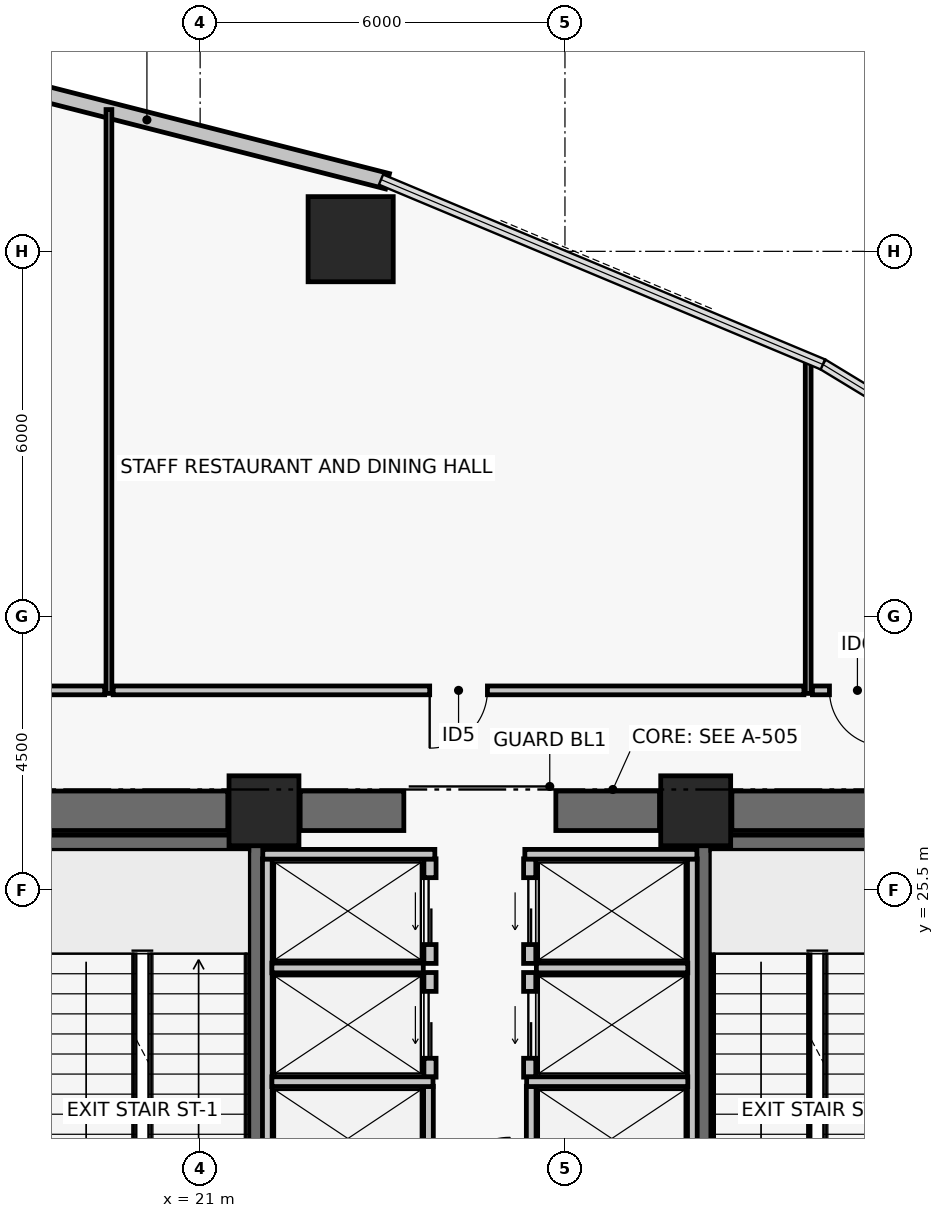
"""IFC4 building model, lengths in metres.
Left out: names, types, materials, properties, quantities, classifications, styles, units other than length and angle.
Written with IfcOpenShell. Run it as: python <this file> out.ifc"""

import sys

from ifc_helpers import new_model, si_unit, direction, frame, frame_2d, origin, origin_2d, place, context, subcontext, project, spatial, rectangle, hollow_rectangle, extrude, element, fill, save


model = new_model("IFC4")
c1 = context("Model", 3, precision=1e-05, world=origin(), true_north=direction((0.0, 1.0)))
c2 = subcontext(c1, "Body", "Model", "MODEL_VIEW")
j1 = project(units=[si_unit("LENGTHUNIT", "METRE"), si_unit("PLANEANGLEUNIT", "RADIAN")], contexts=[c1])
p1 = place(None, origin())
s1 = spatial("IfcSite", under=j1, at=p1, CompositionType="ELEMENT")
p2 = place(p1, origin())
s2 = spatial("IfcBuilding", under=s1, at=p2, CompositionType="ELEMENT")
p3 = place(p2, frame((0.0, 0.0, 18.0)))
s3 = spatial("IfcBuildingStorey", under=s2, at=p3, CompositionType="ELEMENT", Elevation=18.0)
for number, where, z_axis, x_axis in (
    (1, (22.05, 26.8, 0.0), (0.0, 0.0, 1.0), (1.0, 0.0, 0.0)),
    (2, (29.15, 26.8, 0.0), (0.0, 0.0, 1.0), (1.0, 0.0, 0.0)),
):
    element("IfcColumn", number, at=place(p3, frame(where, z_axis=z_axis, x_axis=x_axis)), inside=s3, PredefinedType="COLUMN", context=c2, shape_type="SweptSolid", body=[
        extrude(rectangle(XDim=1.15, YDim=1.15, at=origin_2d()), origin(), (0.0, 0.0, 1.0), 4.8),
    ])
p4 = place(p3, frame((18.395, 26.8, 0.0), z_axis=(0.0, 0.0, 1.0), x_axis=(1.0, 0.0, 0.0)))
e3 = element("IfcWall", 3, at=p4, inside=s3, PredefinedType="SHEAR", context=c2, shape_type="SweptSolid", body=[
    extrude(rectangle(XDim=3.06, YDim=0.65, at=frame_2d((1.53, 0.0))), origin(), (0.0, 0.0, 1.0), 4.48),
])
p5 = place(p3, frame((22.645, 26.8, 0.0), z_axis=(0.0, 0.0, 1.0), x_axis=(1.0, 0.0, 0.0)))
e4 = element("IfcWall", 4, at=p5, inside=s3, PredefinedType="SHEAR", context=c2, shape_type="SweptSolid", body=[
    extrude(rectangle(XDim=1.705, YDim=0.65, at=frame_2d((0.853, 0.0))), origin(), (0.0, 0.0, 1.0), 4.48),
])
p6 = place(p3, frame((26.85, 26.8, 0.0), z_axis=(0.0, 0.0, 1.0), x_axis=(1.0, 0.0, 0.0)))
e5 = element("IfcWall", 5, at=p6, inside=s3, PredefinedType="SHEAR", context=c2, shape_type="SweptSolid", body=[
    extrude(rectangle(XDim=1.705, YDim=0.65, at=frame_2d((0.853, 0.0))), origin(), (0.0, 0.0, 1.0), 4.48),
])
p7 = place(p3, frame((29.745, 26.8, 0.0), z_axis=(0.0, 0.0, 1.0), x_axis=(1.0, 0.0, 0.0)))
e6 = element("IfcWall", 6, at=p7, inside=s3, PredefinedType="SHEAR", context=c2, shape_type="SweptSolid", body=[
    extrude(rectangle(XDim=3.06, YDim=0.65, at=frame_2d((1.53, 0.0))), origin(), (0.0, 0.0, 1.0), 4.48),
])
p8 = place(p3, frame((21.925, 17.6, 0.0), z_axis=(0.0, 0.0, 1.0), x_axis=(0.0, 1.0, 0.0)))
e7 = element("IfcWall", 7, at=p8, inside=s3, PredefinedType="SHEAR", context=c2, shape_type="SweptSolid", body=[
    extrude(rectangle(XDim=8.8, YDim=0.25, at=frame_2d((4.4, 0.0))), origin(), (0.0, 0.0, 1.0), 4.48),
])
p9 = place(p8, frame((0.35, 0.0, 0.0)))
e8 = element("IfcOpeningElement", 8, at=p9, cuts=e7, PredefinedType="OPENING", context=c2, shape_type="SweptSolid", body=[
    extrude(rectangle(XDim=1.05, YDim=2.08, at=frame_2d((0.525, 1.04))), frame((0.0, 0.135, 0.0), z_axis=(0.0, -1.0, 0.0), x_axis=(1.0, 0.0, 0.0)), (0.0, 0.0, 1.0), 0.27),
])
p10 = place(p3, frame((18.379, 26.275, 0.0), z_axis=(0.0, 0.0, 1.0), x_axis=(1.0, 0.0, 0.0)))
e9 = element("IfcWall", 9, at=p10, inside=s3, PredefinedType="SHEAR", context=c2, shape_type="SweptSolid", body=[
    extrude(rectangle(XDim=3.421, YDim=0.25, at=frame_2d((1.71, 0.0))), origin(), (0.0, 0.0, 1.0), 4.48),
])
p11 = place(p3, frame((29.275, 17.6, 0.0), z_axis=(0.0, 0.0, 1.0), x_axis=(0.0, 1.0, 0.0)))
e10 = element("IfcWall", 10, at=p11, inside=s3, PredefinedType="SHEAR", context=c2, shape_type="SweptSolid", body=[
    extrude(rectangle(XDim=8.8, YDim=0.25, at=frame_2d((4.4, 0.0))), origin(), (0.0, 0.0, 1.0), 4.48),
])
p12 = place(p11, frame((0.35, 0.0, 0.0)))
e11 = element("IfcOpeningElement", 11, at=p12, cuts=e10, PredefinedType="OPENING", context=c2, shape_type="SweptSolid", body=[
    extrude(rectangle(XDim=1.05, YDim=2.08, at=frame_2d((0.525, 1.04))), frame((0.0, 0.135, 0.0), z_axis=(0.0, -1.0, 0.0), x_axis=(1.0, 0.0, 0.0)), (0.0, 0.0, 1.0), 0.27),
])
p13 = place(p3, frame((29.4, 26.275, 0.0), z_axis=(0.0, 0.0, 1.0), x_axis=(1.0, 0.0, 0.0)))
e12 = element("IfcWall", 12, at=p13, inside=s3, PredefinedType="SHEAR", context=c2, shape_type="SweptSolid", body=[
    extrude(rectangle(XDim=3.421, YDim=0.25, at=frame_2d((1.71, 0.0))), origin(), (0.0, 0.0, 1.0), 4.48),
])
p14 = place(p3, frame((23.476, 36.2, 0.0), z_axis=(0.0, 0.0, 1.0), x_axis=(1.0, 0.0, 0.0)))
e13 = element("IfcColumn", 13, at=p14, inside=s3, PredefinedType="COLUMN", context=c2, shape_type="SweptSolid", body=[
    extrude(hollow_rectangle(XDim=1.4, YDim=1.4, WallThickness=0.055, at=origin_2d()), origin(), (0.0, 0.0, 1.0), 4.8),
])
p15 = place(p3, frame((16.168, 39.171, 0.0), z_axis=(0.0, 0.0, 1.0), x_axis=(0.968981557045, -0.247133045354, 0.0)))
e14 = element("IfcWall", 14, at=p15, inside=s3, PredefinedType="PARTITIONING", context=c2, shape_type="SweptSolid", body=[
    extrude(rectangle(XDim=8.167, YDim=0.26, at=frame_2d((4.083, 0.0))), origin(), (0.0, 0.0, 1.0), 4.48),
])
p16 = place(p3, frame((24.78, 22.42, 0.0), z_axis=(0.0, 0.0, 1.0), x_axis=(0.0, 1.0, 0.0)))
e15 = element("IfcWall", 15, at=p16, inside=s3, PredefinedType="PARTITIONING", context=c2, shape_type="SweptSolid", body=[
    extrude(rectangle(XDim=1.72, YDim=0.2, at=frame_2d((0.86, 0.0))), origin(), (0.0, 0.0, 1.0), 4.48),
])
p17 = place(p16, frame((0.31, 0.0, 0.0)))
e16 = element("IfcOpeningElement", 16, at=p17, cuts=e15, PredefinedType="OPENING", context=c2, shape_type="SweptSolid", body=[
    extrude(rectangle(XDim=1.1, YDim=2.08, at=frame_2d((0.55, 1.04))), frame((0.0, 0.11, 0.0), z_axis=(0.0, -1.0, 0.0), x_axis=(1.0, 0.0, 0.0)), (0.0, 0.0, 1.0), 0.22),
])
p18 = place(p3, frame((24.78, 24.29, 0.0), z_axis=(0.0, 0.0, 1.0), x_axis=(0.0, 1.0, 0.0)))
e17 = element("IfcWall", 17, at=p18, inside=s3, PredefinedType="PARTITIONING", context=c2, shape_type="SweptSolid", body=[
    extrude(rectangle(XDim=1.72, YDim=0.2, at=frame_2d((0.86, 0.0))), origin(), (0.0, 0.0, 1.0), 4.48),
])
p19 = place(p18, frame((0.31, 0.0, 0.0)))
e18 = element("IfcOpeningElement", 18, at=p19, cuts=e17, PredefinedType="OPENING", context=c2, shape_type="SweptSolid", body=[
    extrude(rectangle(XDim=1.1, YDim=2.08, at=frame_2d((0.55, 1.04))), frame((0.0, 0.11, 0.0), z_axis=(0.0, -1.0, 0.0), x_axis=(1.0, 0.0, 0.0)), (0.0, 0.0, 1.0), 0.22),
])
p20 = place(p3, frame((26.42, 22.42, 0.0), z_axis=(0.0, 0.0, 1.0), x_axis=(0.0, 1.0, 0.0)))
e19 = element("IfcWall", 19, at=p20, inside=s3, PredefinedType="PARTITIONING", context=c2, shape_type="SweptSolid", body=[
    extrude(rectangle(XDim=1.72, YDim=0.2, at=frame_2d((0.86, 0.0))), origin(), (0.0, 0.0, 1.0), 4.48),
])
p21 = place(p20, frame((0.31, 0.0, 0.0)))
e20 = element("IfcOpeningElement", 20, at=p21, cuts=e19, PredefinedType="OPENING", context=c2, shape_type="SweptSolid", body=[
    extrude(rectangle(XDim=1.1, YDim=2.08, at=frame_2d((0.55, 1.04))), frame((0.0, 0.11, 0.0), z_axis=(0.0, -1.0, 0.0), x_axis=(1.0, 0.0, 0.0)), (0.0, 0.0, 1.0), 0.22),
])
p22 = place(p3, frame((26.42, 24.29, 0.0), z_axis=(0.0, 0.0, 1.0), x_axis=(0.0, 1.0, 0.0)))
e21 = element("IfcWall", 21, at=p22, inside=s3, PredefinedType="PARTITIONING", context=c2, shape_type="SweptSolid", body=[
    extrude(rectangle(XDim=1.72, YDim=0.2, at=frame_2d((0.86, 0.0))), origin(), (0.0, 0.0, 1.0), 4.48),
])
p23 = place(p22, frame((0.31, 0.0, 0.0)))
e22 = element("IfcOpeningElement", 22, at=p23, cuts=e21, PredefinedType="OPENING", context=c2, shape_type="SweptSolid", body=[
    extrude(rectangle(XDim=1.1, YDim=2.08, at=frame_2d((0.55, 1.04))), frame((0.0, 0.11, 0.0), z_axis=(0.0, -1.0, 0.0), x_axis=(1.0, 0.0, 0.0)), (0.0, 0.0, 1.0), 0.22),
])
p24 = place(p3, frame((22.105, 20.56, 0.0), z_axis=(0.0, 0.0, 1.0), x_axis=(0.0, 1.0, 0.0)))
e23 = element("IfcWall", 23, at=p24, inside=s3, PredefinedType="PARTITIONING", context=c2, shape_type="SweptSolid", body=[
    extrude(rectangle(XDim=5.45, YDim=0.16, at=frame_2d((2.725, 0.0))), origin(), (0.0, 0.0, 1.0), 4.48),
])
p25 = place(p3, frame((24.755, 20.56, 0.0), z_axis=(0.0, 0.0, 1.0), x_axis=(0.0, 1.0, 0.0)))
e24 = element("IfcWall", 24, at=p25, inside=s3, PredefinedType="PARTITIONING", context=c2, shape_type="SweptSolid", body=[
    extrude(rectangle(XDim=1.71, YDim=0.16, at=frame_2d((0.855, 0.0))), origin(), (0.0, 0.0, 1.0), 4.48),
])
p26 = place(p3, frame((22.18, 22.345, 0.0), z_axis=(0.0, 0.0, 1.0), x_axis=(1.0, 0.0, 0.0)))
e25 = element("IfcWall", 25, at=p26, inside=s3, PredefinedType="PARTITIONING", context=c2, shape_type="SweptSolid", body=[
    extrude(rectangle(XDim=2.65, YDim=0.16, at=frame_2d((1.325, 0.0))), origin(), (0.0, 0.0, 1.0), 4.48),
])
p27 = place(p3, frame((22.18, 24.215, 0.0), z_axis=(0.0, 0.0, 1.0), x_axis=(1.0, 0.0, 0.0)))
e26 = element("IfcWall", 26, at=p27, inside=s3, PredefinedType="PARTITIONING", context=c2, shape_type="SweptSolid", body=[
    extrude(rectangle(XDim=2.49, YDim=0.16, at=frame_2d((1.245, 0.0))), origin(), (0.0, 0.0, 1.0), 4.48),
])
p28 = place(p3, frame((22.03, 26.085, 0.0), z_axis=(0.0, 0.0, 1.0), x_axis=(1.0, 0.0, 0.0)))
e27 = element("IfcWall", 27, at=p28, inside=s3, PredefinedType="PARTITIONING", context=c2, shape_type="SweptSolid", body=[
    extrude(rectangle(XDim=2.83, YDim=0.16, at=frame_2d((1.415, 0.0))), origin(), (0.0, 0.0, 1.0), 4.48),
])
p29 = place(p3, frame((29.095, 20.56, 0.0), z_axis=(0.0, 0.0, 1.0), x_axis=(0.0, 1.0, 0.0)))
e28 = element("IfcWall", 28, at=p29, inside=s3, PredefinedType="PARTITIONING", context=c2, shape_type="SweptSolid", body=[
    extrude(rectangle(XDim=5.45, YDim=0.16, at=frame_2d((2.725, 0.0))), origin(), (0.0, 0.0, 1.0), 4.48),
])
p30 = place(p3, frame((26.445, 20.56, 0.0), z_axis=(0.0, 0.0, 1.0), x_axis=(0.0, 1.0, 0.0)))
e29 = element("IfcWall", 29, at=p30, inside=s3, PredefinedType="PARTITIONING", context=c2, shape_type="SweptSolid", body=[
    extrude(rectangle(XDim=1.71, YDim=0.16, at=frame_2d((0.855, 0.0))), origin(), (0.0, 0.0, 1.0), 4.48),
])
p31 = place(p3, frame((26.37, 22.345, 0.0), z_axis=(0.0, 0.0, 1.0), x_axis=(1.0, 0.0, 0.0)))
e30 = element("IfcWall", 30, at=p31, inside=s3, PredefinedType="PARTITIONING", context=c2, shape_type="SweptSolid", body=[
    extrude(rectangle(XDim=2.65, YDim=0.16, at=frame_2d((1.325, 0.0))), origin(), (0.0, 0.0, 1.0), 4.48),
])
p32 = place(p3, frame((26.53, 24.215, 0.0), z_axis=(0.0, 0.0, 1.0), x_axis=(1.0, 0.0, 0.0)))
e31 = element("IfcWall", 31, at=p32, inside=s3, PredefinedType="PARTITIONING", context=c2, shape_type="SweptSolid", body=[
    extrude(rectangle(XDim=2.49, YDim=0.16, at=frame_2d((1.245, 0.0))), origin(), (0.0, 0.0, 1.0), 4.48),
])
p33 = place(p3, frame((26.34, 26.085, 0.0), z_axis=(0.0, 0.0, 1.0), x_axis=(1.0, 0.0, 0.0)))
e32 = element("IfcWall", 32, at=p33, inside=s3, PredefinedType="PARTITIONING", context=c2, shape_type="SweptSolid", body=[
    extrude(rectangle(XDim=2.83, YDim=0.16, at=frame_2d((1.415, 0.0))), origin(), (0.0, 0.0, 1.0), 4.48),
])
p34 = place(p3, frame((32.8, 28.78, 0.0), z_axis=(0.0, 0.0, 1.0), x_axis=(-1.0, 0.0, 0.0)))
e33 = element("IfcWall", 33, at=p34, inside=s3, PredefinedType="PARTITIONING", context=c2, shape_type="SweptSolid", body=[
    extrude(rectangle(XDim=1.73, YDim=0.145, at=frame_2d((0.865, 0.0))), origin(), (0.0, 0.0, 1.0), 4.01),
])
p35 = place(p34, frame((0.53, 0.0, 0.0)))
e34 = element("IfcOpeningElement", 34, at=p35, cuts=e33, PredefinedType="OPENING", context=c2, shape_type="SweptSolid", body=[
    extrude(rectangle(XDim=0.92, YDim=2.05, at=frame_2d((0.46, 1.025))), frame((0.0, 0.083, 0.0), z_axis=(0.0, -1.0, 0.0), x_axis=(1.0, 0.0, 0.0)), (0.0, 0.0, 1.0), 0.165),
])
p36 = place(p3, frame((30.93, 28.78, 0.0), z_axis=(0.0, 0.0, 1.0), x_axis=(-1.0, 0.0, 0.0)))
e35 = element("IfcWall", 35, at=p36, inside=s3, PredefinedType="PARTITIONING", context=c2, shape_type="SweptSolid", body=[
    extrude(rectangle(XDim=11.36, YDim=0.145, at=frame_2d((5.68, 0.0))), origin(), (0.0, 0.0, 1.0), 3.56),
])
p37 = place(p36, frame((5.205, 0.0, 0.0)))
e36 = element("IfcOpeningElement", 36, at=p37, cuts=e35, PredefinedType="OPENING", context=c2, shape_type="SweptSolid", body=[
    extrude(rectangle(XDim=0.95, YDim=2.06, at=frame_2d((0.475, 1.03))), frame((0.0, 0.083, 0.0), z_axis=(0.0, -1.0, 0.0), x_axis=(1.0, 0.0, 0.0)), (0.0, 0.0, 1.0), 0.165),
])
p38 = place(p3, frame((19.43, 28.78, 0.0), z_axis=(0.0, 0.0, 1.0), x_axis=(-1.0, 0.0, 0.0)))
e37 = element("IfcWall", 37, at=p38, inside=s3, PredefinedType="PARTITIONING", context=c2, shape_type="SweptSolid", body=[
    extrude(rectangle(XDim=3.53, YDim=0.145, at=frame_2d((1.765, 0.0))), origin(), (0.0, 0.0, 1.0), 3.56),
])
p39 = place(p38, frame((2.33, 0.0, 0.0)))
e38 = element("IfcOpeningElement", 38, at=p39, cuts=e37, PredefinedType="OPENING", context=c2, shape_type="SweptSolid", body=[
    extrude(rectangle(XDim=0.92, YDim=2.05, at=frame_2d((0.46, 1.025))), frame((0.0, 0.083, 0.0), z_axis=(0.0, -1.0, 0.0), x_axis=(1.0, 0.0, 0.0)), (0.0, 0.0, 1.0), 0.165),
])
p40 = place(p3, frame((19.5, 28.73, 0.0), z_axis=(0.0, 0.0, 1.0), x_axis=(0.0, 1.0, 0.0)))
e39 = element("IfcWall", 39, at=p40, inside=s3, PredefinedType="PARTITIONING", context=c2, shape_type="SweptSolid", body=[
    extrude(rectangle(XDim=9.602, YDim=0.095, at=frame_2d((4.801, 0.0))), origin(), (0.0, 0.0, 1.0), 3.86),
])
p41 = place(p3, frame((31.0, 28.73, 0.0), z_axis=(0.0, 0.0, 1.0), x_axis=(0.0, 1.0, 0.0)))
e40 = element("IfcWall", 40, at=p41, inside=s3, PredefinedType="PARTITIONING", context=c2, shape_type="SweptSolid", body=[
    extrude(rectangle(XDim=5.522, YDim=0.095, at=frame_2d((2.761, 0.0))), origin(), (0.0, 0.0, 1.0), 3.86),
])
p42 = place(p17, origin())
e41 = element("IfcDoor", 41, at=p42, inside=s3, OperationType="DOUBLE_DOOR_SLIDING", PredefinedType="DOOR", context=c2, shape_type="SweptSolid", body=[
    extrude(rectangle(XDim=1.1, YDim=2.08, at=frame_2d((0.55, 1.04))), frame((0.0, 0.025, 0.0), z_axis=(0.0, -1.0, 0.0), x_axis=(1.0, 0.0, 0.0)), (0.0, 0.0, 1.0), 0.05),
])
fill(e16, e41)
p43 = place(p19, origin())
e42 = element("IfcDoor", 42, at=p43, inside=s3, OperationType="DOUBLE_DOOR_SLIDING", PredefinedType="DOOR", context=c2, shape_type="SweptSolid", body=[
    extrude(rectangle(XDim=1.1, YDim=2.08, at=frame_2d((0.55, 1.04))), frame((0.0, 0.025, 0.0), z_axis=(0.0, -1.0, 0.0), x_axis=(1.0, 0.0, 0.0)), (0.0, 0.0, 1.0), 0.05),
])
fill(e18, e42)
p44 = place(p21, origin())
e43 = element("IfcDoor", 43, at=p44, inside=s3, OperationType="DOUBLE_DOOR_SLIDING", PredefinedType="DOOR", context=c2, shape_type="SweptSolid", body=[
    extrude(rectangle(XDim=1.1, YDim=2.08, at=frame_2d((0.55, 1.04))), frame((0.0, 0.025, 0.0), z_axis=(0.0, -1.0, 0.0), x_axis=(1.0, 0.0, 0.0)), (0.0, 0.0, 1.0), 0.05),
])
fill(e20, e43)
p45 = place(p23, origin())
e44 = element("IfcDoor", 44, at=p45, inside=s3, OperationType="DOUBLE_DOOR_SLIDING", PredefinedType="DOOR", context=c2, shape_type="SweptSolid", body=[
    extrude(rectangle(XDim=1.1, YDim=2.08, at=frame_2d((0.55, 1.04))), frame((0.0, 0.025, 0.0), z_axis=(0.0, -1.0, 0.0), x_axis=(1.0, 0.0, 0.0)), (0.0, 0.0, 1.0), 0.05),
])
fill(e22, e44)
p46 = place(p35, origin())
e45 = element("IfcDoor", 45, at=p46, inside=s3, OperationType="SINGLE_SWING_LEFT", PredefinedType="DOOR", context=c2, shape_type="SweptSolid", body=[
    extrude(rectangle(XDim=0.92, YDim=2.05, at=frame_2d((0.46, 1.025))), frame((0.0, 0.025, 0.0), z_axis=(0.0, -1.0, 0.0), x_axis=(1.0, 0.0, 0.0)), (0.0, 0.0, 1.0), 0.05),
])
fill(e34, e45)
p47 = place(p37, origin())
e46 = element("IfcDoor", 46, at=p47, inside=s3, OperationType="SINGLE_SWING_RIGHT", PredefinedType="DOOR", context=c2, shape_type="SweptSolid", body=[
    extrude(rectangle(XDim=0.95, YDim=2.06, at=frame_2d((0.475, 1.03))), frame((0.0, 0.025, 0.0), z_axis=(0.0, -1.0, 0.0), x_axis=(1.0, 0.0, 0.0)), (0.0, 0.0, 1.0), 0.05),
])
fill(e36, e46)
save(model, sys.argv[1])
